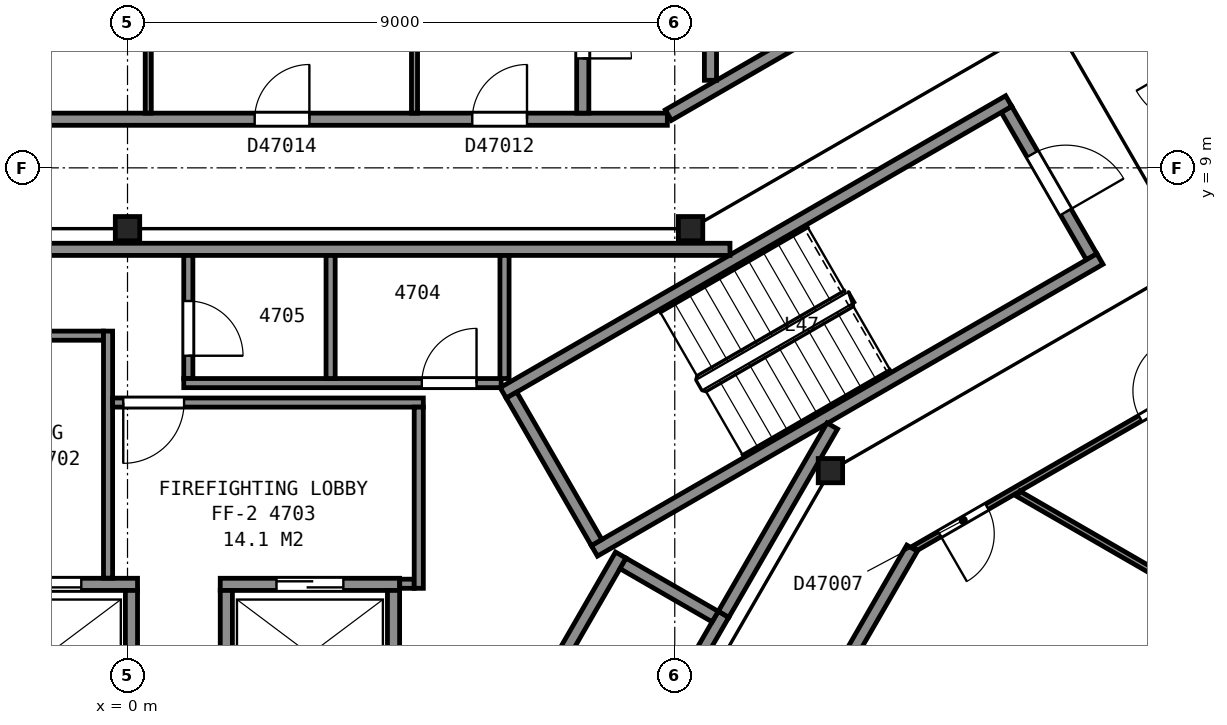
"""IFC4 building model, lengths in metres.
Left out: names, types, materials, properties, quantities, classifications, styles, units other than length and angle.
Written with IfcOpenShell. Run it as: python <this file> out.ifc"""

import sys

from ifc_helpers import new_model, si_unit, direction, frame, frame_2d, origin, origin_2d, place, context, subcontext, project, spatial, rectangle, i_section, extrude, element, fill, save


model = new_model("IFC4")
c1 = context("Model", 3, precision=1e-05, world=origin(), true_north=direction((0.0, 1.0)))
c2 = subcontext(c1, "Body", "Model", "MODEL_VIEW")
j1 = project(units=[si_unit("LENGTHUNIT", "METRE"), si_unit("PLANEANGLEUNIT", "RADIAN")], contexts=[c1])
p1 = place(None, origin())
s1 = spatial("IfcSite", under=j1, at=p1, CompositionType="ELEMENT")
p2 = place(p1, origin())
s2 = spatial("IfcBuilding", under=s1, at=p2, CompositionType="ELEMENT")
p3 = place(p2, frame((0.0, 0.0, 189.5)))
s3 = spatial("IfcBuildingStorey", under=s2, at=p3, CompositionType="ELEMENT", Elevation=189.5)
for number, where, z_axis, x_axis in (
    (1, (11.56, 4.02, 0.0), (0.0, 0.0, 1.0), (1.0, 0.0, 0.0)),
    (2, (9.26, 8.0, 0.0), (0.0, 0.0, 1.0), (1.0, 0.0, 0.0)),
    (3, (0.0, 8.0, 0.0), (0.0, 0.0, 1.0), (1.0, 0.0, 0.0)),
):
    element("IfcColumn", number, at=place(p3, frame(where, z_axis=z_axis, x_axis=x_axis)), inside=s3, PredefinedType="COLUMN", context=c2, shape_type="SweptSolid", body=[
        extrude(i_section(OverallWidth=0.401, OverallDepth=0.399, WebThickness=0.025, FlangeThickness=0.04, FilletRadius=0.015, at=origin_2d()), origin(), (0.0, 0.0, 1.0), 3.7),
    ])
p4 = place(p3, frame((15.855, 7.538, 0.0), z_axis=(0.0, 0.0, 1.0), x_axis=(-0.500049511043, 0.865996816683, 0.0)))
e4 = element("IfcWall", 4, at=p4, inside=s3, PredefinedType="PARTITIONING", context=c2, shape_type="SweptSolid", body=[
    extrude(rectangle(XDim=2.8, YDim=0.2, at=frame_2d((1.4, 0.0))), origin(), (0.0, 0.0, 1.0), 3.45),
])
p5 = place(p4, frame((0.85, 0.0, 0.0)))
e5 = element("IfcOpeningElement", 5, at=p5, cuts=e4, PredefinedType="OPENING", context=c2, shape_type="SweptSolid", body=[
    extrude(rectangle(XDim=1.1, YDim=2.1, at=frame_2d((0.55, 1.05))), frame((0.0, 0.11, 0.0), z_axis=(0.0, -1.0, 0.0), x_axis=(1.0, 0.0, 0.0)), (0.0, 0.0, 1.0), 0.22),
])
for number, where, z_axis, x_axis in (
    (6, (6.178, 5.299, 0.0), (0.0, 0.0, 1.0), (0.866, 0.5, 0.0)),
    (7, (7.678, 2.701, 0.0), (0.0, 0.0, 1.0), (0.866, 0.5, 0.0)),
):
    element("IfcWall", number, at=place(p3, frame(where, z_axis=z_axis, x_axis=x_axis)), inside=s3, PredefinedType="PARTITIONING", context=c2, shape_type="SweptSolid", body=[
        extrude(rectangle(XDim=9.6, YDim=0.2, at=frame_2d((4.8, 0.0))), origin(), (0.0, 0.0, 1.0), 3.45),
    ])
p6 = place(p3, frame((7.715, 2.838, 0.0), z_axis=(0.0, 0.0, 1.0), x_axis=(-0.500049511043, 0.865996816683, 0.0)))
e8 = element("IfcWall", 8, at=p6, inside=s3, PredefinedType="PARTITIONING", context=c2, shape_type="SweptSolid", body=[
    extrude(rectangle(XDim=2.8, YDim=0.2, at=frame_2d((1.4, 0.0))), origin(), (0.0, 0.0, 1.0), 3.45),
])
p7 = place(p3, frame((-2.785, 2.15, 0.0), z_axis=(0.0, 0.0, 1.0), x_axis=(1.0, 0.0, 0.0)))
e9 = element("IfcWall", 9, at=p7, inside=s3, PredefinedType="PARTITIONING", context=c2, shape_type="SweptSolid", body=[
    extrude(rectangle(XDim=2.95, YDim=0.2, at=frame_2d((1.475, 0.0))), origin(), (0.0, 0.0, 1.0), 3.7),
])
p8 = place(p7, frame((0.925, 0.0, 0.0)))
e10 = element("IfcOpeningElement", 10, at=p8, cuts=e9, PredefinedType="OPENING", context=c2, shape_type="SweptSolid", body=[
    extrude(rectangle(XDim=1.1, YDim=2.1, at=frame_2d((0.55, 1.05))), frame((0.0, 0.11, 0.0), z_axis=(0.0, -1.0, 0.0), x_axis=(1.0, 0.0, 0.0)), (0.0, 0.0, 1.0), 0.22),
])
p9 = place(p3, frame((1.525, 2.15, 0.0), z_axis=(0.0, 0.0, 1.0), x_axis=(1.0, 0.0, 0.0)))
e11 = element("IfcWall", 11, at=p9, inside=s3, PredefinedType="PARTITIONING", context=c2, shape_type="SweptSolid", body=[
    extrude(rectangle(XDim=2.95, YDim=0.2, at=frame_2d((1.475, 0.0))), origin(), (0.0, 0.0, 1.0), 3.7),
])
p10 = place(p9, frame((0.925, 0.0, 0.0)))
e12 = element("IfcOpeningElement", 12, at=p10, cuts=e11, PredefinedType="OPENING", context=c2, shape_type="SweptSolid", body=[
    extrude(rectangle(XDim=1.1, YDim=2.1, at=frame_2d((0.55, 1.05))), frame((0.0, 0.11, 0.0), z_axis=(0.0, -1.0, 0.0), x_axis=(1.0, 0.0, 0.0)), (0.0, 0.0, 1.0), 0.22),
])
p11 = place(p3, frame((7.351, -2.587, 0.0), z_axis=(0.0, 0.0, 1.0), x_axis=(0.500002801628, 0.866023786258, 0.0)))
e13 = element("IfcWall", 13, at=p11, inside=s3, PredefinedType="PARTITIONING", context=c2, shape_type="SweptSolid", body=[
    extrude(rectangle(XDim=4.9, YDim=0.2, at=frame_2d((2.45, 0.0))), origin(), (0.0, 0.0, 1.0), 3.7),
])
p12 = place(p3, frame((5.663, -1.612, 0.0), z_axis=(0.0, 0.0, 1.0), x_axis=(0.49998122708, 0.866036242063, 0.0)))
e14 = element("IfcWall", 14, at=p12, inside=s3, PredefinedType="PARTITIONING", context=c2, shape_type="SweptSolid", body=[
    extrude(rectangle(XDim=4.9, YDim=0.2, at=frame_2d((2.45, 0.0))), origin(), (0.0, 0.0, 1.0), 3.7),
])
for number, where, z_axis, x_axis in (
    (15, (4.375, 0.1, 0.0), (0.0, 0.0, 1.0), (0.0, 1.0, 0.0)),
    (16, (1.625, 0.1, 0.0), (0.0, 0.0, 1.0), (0.0, 1.0, 0.0)),
    (17, (0.065, 0.1, 0.0), (0.0, 0.0, 1.0), (0.0, 1.0, 0.0)),
):
    element("IfcWall", number, at=place(p3, frame(where, z_axis=z_axis, x_axis=x_axis)), inside=s3, PredefinedType="PARTITIONING", context=c2, shape_type="SweptSolid", body=[
        extrude(rectangle(XDim=1.95, YDim=0.2, at=frame_2d((0.975, 0.0))), origin(), (0.0, 0.0, 1.0), 3.7),
    ])
p13 = place(p3, frame((9.665, 1.62, 0.0), z_axis=(0.0, 0.0, 1.0), x_axis=(-0.866002029911, 0.500040482552, 0.0)))
e18 = element("IfcWall", 18, at=p13, inside=s3, PredefinedType="PARTITIONING", context=c2, shape_type="SweptSolid", body=[
    extrude(rectangle(XDim=1.75, YDim=0.2, at=frame_2d((0.875, 0.0))), origin(), (0.0, 0.0, 1.0), 3.7),
])
p14 = place(p3, frame((-3.933, 6.24, 0.0), z_axis=(0.0, 0.0, 1.0), x_axis=(1.0, 0.0, 0.0)))
e19 = element("IfcWall", 19, at=p14, inside=s3, PredefinedType="PARTITIONING", context=c2, shape_type="SweptSolid", body=[
    extrude(rectangle(XDim=3.538, YDim=0.15, at=frame_2d((1.769, 0.0))), origin(), (0.0, 0.0, 1.0), 3.45),
])
p15 = place(p14, frame((1.3, 0.0, 0.0)))
e20 = element("IfcOpeningElement", 20, at=p15, cuts=e19, PredefinedType="OPENING", context=c2, shape_type="SweptSolid", body=[
    extrude(rectangle(XDim=1.0, YDim=2.1, at=frame_2d((0.5, 1.05))), frame((0.0, 0.085, 0.0), z_axis=(0.0, -1.0, 0.0), x_axis=(1.0, 0.0, 0.0)), (0.0, 0.0, 1.0), 0.17),
])
p16 = place(p3, frame((-3.933, 7.66, 0.0), z_axis=(0.0, 0.0, 1.0), x_axis=(1.0, 0.0, 0.0)))
e21 = element("IfcWall", 21, at=p16, inside=s3, PredefinedType="PARTITIONING", context=c2, shape_type="SweptSolid", body=[
    extrude(rectangle(XDim=13.841, YDim=0.2, at=frame_2d((6.92, 0.0))), origin(), (0.0, 0.0, 1.0), 3.45),
])
p17 = place(p3, frame((-0.32, 2.252, 0.0), z_axis=(0.0, 0.0, 1.0), x_axis=(0.0, 1.0, 0.0)))
e22 = element("IfcWall", 22, at=p17, inside=s3, PredefinedType="PARTITIONING", context=c2, shape_type="SweptSolid", body=[
    extrude(rectangle(XDim=4.063, YDim=0.15, at=frame_2d((2.031, 0.0))), origin(), (0.0, 0.0, 1.0), 3.45),
])
p18 = place(p3, frame((-0.245, 5.14, 0.0), z_axis=(0.0, 0.0, 1.0), x_axis=(1.0, 0.0, 0.0)))
e23 = element("IfcWall", 23, at=p18, inside=s3, PredefinedType="PARTITIONING", context=c2, shape_type="SweptSolid", body=[
    extrude(rectangle(XDim=5.11, YDim=0.15, at=frame_2d((2.555, 0.0))), origin(), (0.0, 0.0, 1.0), 3.45),
])
p19 = place(p18, frame((0.175, 0.0, 0.0)))
e24 = element("IfcOpeningElement", 24, at=p19, cuts=e23, PredefinedType="OPENING", context=c2, shape_type="SweptSolid", body=[
    extrude(rectangle(XDim=1.0, YDim=2.1, at=frame_2d((0.5, 1.05))), frame((0.0, 0.085, 0.0), z_axis=(0.0, -1.0, 0.0), x_axis=(1.0, 0.0, 0.0)), (0.0, 0.0, 1.0), 0.17),
])
p20 = place(p3, frame((1.0, 7.56, 0.0), z_axis=(0.0, 0.0, 1.0), x_axis=(0.0, -1.0, 0.0)))
e25 = element("IfcWall", 25, at=p20, inside=s3, PredefinedType="PARTITIONING", context=c2, shape_type="SweptSolid", body=[
    extrude(rectangle(XDim=2.025, YDim=0.15, at=frame_2d((1.013, 0.0))), origin(), (0.0, 0.0, 1.0), 3.45),
])
p21 = place(p20, frame((0.75, 0.0, 0.0)))
e26 = element("IfcOpeningElement", 26, at=p21, cuts=e25, PredefinedType="OPENING", context=c2, shape_type="SweptSolid", body=[
    extrude(rectangle(XDim=0.9, YDim=2.1, at=frame_2d((0.45, 1.05))), frame((0.0, 0.085, 0.0), z_axis=(0.0, -1.0, 0.0), x_axis=(1.0, 0.0, 0.0)), (0.0, 0.0, 1.0), 0.17),
])
p22 = place(p3, frame((0.925, 5.46, 0.0), z_axis=(0.0, 0.0, 1.0), x_axis=(1.0, 0.0, 0.0)))
e27 = element("IfcWall", 27, at=p22, inside=s3, PredefinedType="PARTITIONING", context=c2, shape_type="SweptSolid", body=[
    extrude(rectangle(XDim=5.22, YDim=0.15, at=frame_2d((2.61, 0.0))), origin(), (0.0, 0.0, 1.0), 3.45),
])
p23 = place(p22, frame((3.915, 0.0, 0.0)))
e28 = element("IfcOpeningElement", 28, at=p23, cuts=e27, PredefinedType="OPENING", context=c2, shape_type="SweptSolid", body=[
    extrude(rectangle(XDim=0.9, YDim=2.1, at=frame_2d((0.45, 1.05))), frame((0.0, 0.085, 0.0), z_axis=(0.0, -1.0, 0.0), x_axis=(1.0, 0.0, 0.0)), (0.0, 0.0, 1.0), 0.17),
])
p24 = place(p3, frame((3.34, 5.535, 0.0), z_axis=(0.0, 0.0, 1.0), x_axis=(0.0, 1.0, 0.0)))
e29 = element("IfcWall", 29, at=p24, inside=s3, PredefinedType="PARTITIONING", context=c2, shape_type="SweptSolid", body=[
    extrude(rectangle(XDim=2.025, YDim=0.15, at=frame_2d((1.013, 0.0))), origin(), (0.0, 0.0, 1.0), 3.45),
])
p25 = place(p3, frame((4.477, 2.16, 0.0), z_axis=(0.0, 0.0, 1.0), x_axis=(1.0, 0.0, 0.0)))
e30 = element("IfcWall", 30, at=p25, inside=s3, PredefinedType="PARTITIONING", context=c2, shape_type="SweptSolid", body=[
    extrude(rectangle(XDim=0.238, YDim=0.15, at=frame_2d((0.119, 0.0))), origin(), (0.0, 0.0, 1.0), 3.45),
])
p26 = place(p3, frame((4.79, 2.085, 0.0), z_axis=(0.0, 0.0, 1.0), x_axis=(0.0, 1.0, 0.0)))
e31 = element("IfcWall", 31, at=p26, inside=s3, PredefinedType="PARTITIONING", context=c2, shape_type="SweptSolid", body=[
    extrude(rectangle(XDim=2.98, YDim=0.15, at=frame_2d((1.49, 0.0))), origin(), (0.0, 0.0, 1.0), 3.45),
])
p27 = place(p3, frame((6.2, 5.535, 0.0), z_axis=(0.0, 0.0, 1.0), x_axis=(0.0, 1.0, 0.0)))
e32 = element("IfcWall", 32, at=p27, inside=s3, PredefinedType="PARTITIONING", context=c2, shape_type="SweptSolid", body=[
    extrude(rectangle(XDim=2.025, YDim=0.15, at=frame_2d((1.013, 0.0))), origin(), (0.0, 0.0, 1.0), 3.45),
])
p28 = place(p3, frame((9.803, 1.658, 0.0), z_axis=(0.0, 0.0, 1.0), x_axis=(0.499943114462, 0.866058244174, 0.0)))
e33 = element("IfcWall", 33, at=p28, inside=s3, PredefinedType="PARTITIONING", context=c2, shape_type="SweptSolid", body=[
    extrude(rectangle(XDim=3.576, YDim=0.2, at=frame_2d((1.788, 0.0))), origin(), (0.0, 0.0, 1.0), 3.45),
])
p29 = place(p3, frame((-8.828, 9.8, 0.0), z_axis=(0.0, 0.0, 1.0), x_axis=(1.0, 0.0, 0.0)))
e34 = element("IfcWall", 34, at=p29, inside=s3, PredefinedType="PARTITIONING", context=c2, shape_type="SweptSolid", body=[
    extrude(rectangle(XDim=17.706, YDim=0.2, at=frame_2d((8.853, 0.0))), origin(), (0.0, 0.0, 1.0), 2.713),
])
p30 = place(p29, frame((14.498, 0.0, 0.0)))
e35 = element("IfcOpeningElement", 35, at=p30, cuts=e34, PredefinedType="OPENING", context=c2, shape_type="SweptSolid", body=[
    extrude(rectangle(XDim=0.9, YDim=2.1, at=frame_2d((0.45, 1.05))), frame((0.0, 0.11, 0.0), z_axis=(0.0, -1.0, 0.0), x_axis=(1.0, 0.0, 0.0)), (0.0, 0.0, 1.0), 0.22),
])
p31 = place(p29, frame((10.919, 0.0, 0.0)))
e36 = element("IfcOpeningElement", 36, at=p31, cuts=e34, PredefinedType="OPENING", context=c2, shape_type="SweptSolid", body=[
    extrude(rectangle(XDim=0.9, YDim=2.1, at=frame_2d((0.45, 1.05))), frame((0.0, 0.11, 0.0), z_axis=(0.0, -1.0, 0.0), x_axis=(1.0, 0.0, 0.0)), (0.0, 0.0, 1.0), 0.22),
])
p32 = place(p29, frame((6.113, 0.0, 0.0)))
e37 = element("IfcOpeningElement", 37, at=p32, cuts=e34, PredefinedType="OPENING", context=c2, shape_type="SweptSolid", body=[
    extrude(rectangle(XDim=0.9, YDim=2.1, at=frame_2d((0.45, 1.05))), frame((0.0, 0.11, 0.0), z_axis=(0.0, -1.0, 0.0), x_axis=(1.0, 0.0, 0.0)), (0.0, 0.0, 1.0), 0.22),
])
for number, where, z_axis, x_axis in (
    (38, (0.341, 9.9, 0.0), (0.0, 0.0, 1.0), (0.0, 1.0, 0.0)),
    (39, (4.72, 9.9, 0.0), (0.0, 0.0, 1.0), (0.0, 1.0, 0.0)),
):
    element("IfcWall", number, at=place(p3, frame(where, z_axis=z_axis, x_axis=x_axis)), inside=s3, PredefinedType="PARTITIONING", context=c2, shape_type="SweptSolid", body=[
        extrude(rectangle(XDim=8.435, YDim=0.1, at=frame_2d((4.218, 0.0))), origin(), (0.0, 0.0, 1.0), 2.713),
    ])
p33 = place(p3, frame((12.903, 2.745, 0.0), z_axis=(0.0, 0.0, 1.0), x_axis=(-0.499992063946, -0.866029985619, 0.0)))
e40 = element("IfcWall", 40, at=p33, inside=s3, PredefinedType="PARTITIONING", context=c2, shape_type="SweptSolid", body=[
    extrude(rectangle(XDim=12.907, YDim=0.2, at=frame_2d((6.454, 0.0))), origin(), (0.0, 0.0, 1.0), 2.713),
])
p34 = place(p33, frame((9.032, 0.0, 0.0)))
e41 = element("IfcOpeningElement", 41, at=p34, cuts=e40, PredefinedType="OPENING", context=c2, shape_type="SweptSolid", body=[
    extrude(rectangle(XDim=0.9, YDim=2.1, at=frame_2d((0.45, 1.05))), frame((0.0, 0.11, 0.0), z_axis=(0.0, -1.0, 0.0), x_axis=(1.0, 0.0, 0.0)), (0.0, 0.0, 1.0), 0.22),
])
p35 = place(p33, frame((5.349, 0.0, 0.0)))
e42 = element("IfcOpeningElement", 42, at=p35, cuts=e40, PredefinedType="OPENING", context=c2, shape_type="SweptSolid", body=[
    extrude(rectangle(XDim=0.9, YDim=2.1, at=frame_2d((0.45, 1.05))), frame((0.0, 0.11, 0.0), z_axis=(0.0, -1.0, 0.0), x_axis=(1.0, 0.0, 0.0)), (0.0, 0.0, 1.0), 0.22),
])
p36 = place(p3, frame((7.487, 12.7, 0.0), z_axis=(0.0, 0.0, 1.0), x_axis=(0.0, -1.0, 0.0)))
e43 = element("IfcWall", 43, at=p36, inside=s3, PredefinedType="PARTITIONING", context=c2, shape_type="SweptSolid", body=[
    extrude(rectangle(XDim=2.8, YDim=0.2, at=frame_2d((1.4, 0.0))), origin(), (0.0, 0.0, 1.0), 2.713),
])
p37 = place(p36, frame((1.1, 0.0, 0.0)))
e44 = element("IfcOpeningElement", 44, at=p37, cuts=e43, PredefinedType="OPENING", context=c2, shape_type="SweptSolid", body=[
    extrude(rectangle(XDim=0.8, YDim=2.1, at=frame_2d((0.4, 1.05))), frame((0.0, 0.11, 0.0), z_axis=(0.0, -1.0, 0.0), x_axis=(1.0, 0.0, 0.0)), (0.0, 0.0, 1.0), 0.22),
])
p38 = place(p3, frame((8.895, 9.867, 0.0), z_axis=(0.0, 0.0, 1.0), x_axis=(0.866079355551, 0.499906541154, 0.0)))
e45 = element("IfcWall", 45, at=p38, inside=s3, PredefinedType="PARTITIONING", context=c2, shape_type="SweptSolid", body=[
    extrude(rectangle(XDim=8.113, YDim=0.2, at=frame_2d((4.056, 0.0))), origin(), (0.0, 0.0, 1.0), 2.713),
])
p39 = place(p38, frame((5.201, 0.0, 0.0)))
e46 = element("IfcOpeningElement", 46, at=p39, cuts=e45, PredefinedType="OPENING", context=c2, shape_type="SweptSolid", body=[
    extrude(rectangle(XDim=0.9, YDim=2.1, at=frame_2d((0.45, 1.05))), frame((0.0, 0.11, 0.0), z_axis=(0.0, -1.0, 0.0), x_axis=(1.0, 0.0, 0.0)), (0.0, 0.0, 1.0), 0.22),
])
p40 = place(p3, frame((9.587, 10.44, 0.0), z_axis=(0.0, 0.0, 1.0), x_axis=(0.0, 1.0, 0.0)))
e47 = element("IfcWall", 47, at=p40, inside=s3, PredefinedType="PARTITIONING", context=c2, shape_type="SweptSolid", body=[
    extrude(rectangle(XDim=7.895, YDim=0.2, at=frame_2d((3.947, 0.0))), origin(), (0.0, 0.0, 1.0), 2.713),
])
p41 = place(p3, frame((20.023, 6.826, 0.0), z_axis=(0.0, 0.0, 1.0), x_axis=(-0.86608949446, -0.499888975259, 0.0)))
e48 = element("IfcWall", 48, at=p41, inside=s3, PredefinedType="PARTITIONING", context=c2, shape_type="SweptSolid", body=[
    extrude(rectangle(XDim=8.165, YDim=0.1, at=frame_2d((4.083, 0.0))), origin(), (0.0, 0.0, 1.0), 2.713),
])
p42 = place(p41, frame((6.8, 0.0, 0.0)))
e49 = element("IfcOpeningElement", 49, at=p42, cuts=e48, PredefinedType="OPENING", context=c2, shape_type="SweptSolid", body=[
    extrude(rectangle(XDim=0.9, YDim=2.1, at=frame_2d((0.45, 1.05))), frame((0.0, 0.06, 0.0), z_axis=(0.0, -1.0, 0.0), x_axis=(1.0, 0.0, 0.0)), (0.0, 0.0, 1.0), 0.12),
])
p43 = place(p41, frame((2.989, 0.0, 0.0)))
e50 = element("IfcOpeningElement", 50, at=p43, cuts=e48, PredefinedType="OPENING", context=c2, shape_type="SweptSolid", body=[
    extrude(rectangle(XDim=0.9, YDim=2.1, at=frame_2d((0.45, 1.05))), frame((0.0, 0.06, 0.0), z_axis=(0.0, -1.0, 0.0), x_axis=(1.0, 0.0, 0.0)), (0.0, 0.0, 1.0), 0.12),
])
p44 = place(p3, frame((14.651, 3.64, 0.0), z_axis=(0.0, 0.0, 1.0), x_axis=(0.866021145342, -0.500007375767, 0.0)))
e51 = element("IfcWall", 51, at=p44, inside=s3, PredefinedType="PARTITIONING", context=c2, shape_type="SweptSolid", body=[
    extrude(rectangle(XDim=7.467, YDim=0.1, at=frame_2d((3.733, 0.0))), origin(), (0.0, 0.0, 1.0), 2.713),
])
p45 = place(p3, frame((15.928, 13.812, 0.0), z_axis=(0.0, 0.0, 1.0), x_axis=(0.500422653123, -0.865781247337, 0.0)))
e52 = element("IfcWall", 52, at=p45, inside=s3, PredefinedType="PARTITIONING", context=c2, shape_type="SweptSolid", body=[
    extrude(rectangle(XDim=8.047, YDim=0.1, at=frame_2d((4.024, 0.0))), origin(), (0.0, 0.0, 1.0), 2.713),
])
p46 = place(p45, frame((3.4, 0.0, 0.0)))
e53 = element("IfcOpeningElement", 53, at=p46, cuts=e52, PredefinedType="OPENING", context=c2, shape_type="SweptSolid", body=[
    extrude(rectangle(XDim=1.2, YDim=2.1, at=frame_2d((0.6, 1.05))), frame((0.0, 0.06, 0.0), z_axis=(0.0, -1.0, 0.0), x_axis=(1.0, 0.0, 0.0)), (0.0, 0.0, 1.0), 0.12),
])
p47 = place(p5, origin())
e54 = element("IfcDoor", 54, at=p47, inside=s3, OperationType="SINGLE_SWING_LEFT", PredefinedType="DOOR", context=c2, shape_type="SweptSolid", body=[
    extrude(rectangle(XDim=1.1, YDim=2.1, at=frame_2d((0.55, 1.05))), frame((0.0, 0.025, 0.0), z_axis=(0.0, -1.0, 0.0), x_axis=(1.0, 0.0, 0.0)), (0.0, 0.0, 1.0), 0.05),
])
fill(e5, e54)
p48 = place(p8, origin())
e55 = element("IfcDoor", 55, at=p48, inside=s3, OperationType="SLIDING_TO_LEFT", PredefinedType="DOOR", context=c2, shape_type="SweptSolid", body=[
    extrude(rectangle(XDim=1.1, YDim=2.1, at=frame_2d((0.55, 1.05))), frame((0.0, 0.025, 0.0), z_axis=(0.0, -1.0, 0.0), x_axis=(1.0, 0.0, 0.0)), (0.0, 0.0, 1.0), 0.05),
])
fill(e10, e55)
p49 = place(p10, origin())
e56 = element("IfcDoor", 56, at=p49, inside=s3, OperationType="SLIDING_TO_RIGHT", PredefinedType="DOOR", context=c2, shape_type="SweptSolid", body=[
    extrude(rectangle(XDim=1.1, YDim=2.1, at=frame_2d((0.55, 1.05))), frame((0.0, 0.025, 0.0), z_axis=(0.0, -1.0, 0.0), x_axis=(1.0, 0.0, 0.0)), (0.0, 0.0, 1.0), 0.05),
])
fill(e12, e56)
p50 = place(p19, origin())
e57 = element("IfcDoor", 57, at=p50, inside=s3, OperationType="SINGLE_SWING_LEFT", PredefinedType="DOOR", context=c2, shape_type="SweptSolid", body=[
    extrude(rectangle(XDim=1.0, YDim=2.1, at=frame_2d((0.5, 1.05))), frame((0.0, 0.025, 0.0), z_axis=(0.0, -1.0, 0.0), x_axis=(1.0, 0.0, 0.0)), (0.0, 0.0, 1.0), 0.05),
])
fill(e24, e57)
p51 = place(p21, origin())
e58 = element("IfcDoor", 58, at=p51, inside=s3, OperationType="SINGLE_SWING_RIGHT", PredefinedType="DOOR", context=c2, shape_type="SweptSolid", body=[
    extrude(rectangle(XDim=0.9, YDim=2.1, at=frame_2d((0.45, 1.05))), frame((0.0, 0.025, 0.0), z_axis=(0.0, -1.0, 0.0), x_axis=(1.0, 0.0, 0.0)), (0.0, 0.0, 1.0), 0.05),
])
fill(e26, e58)
p52 = place(p23, origin())
e59 = element("IfcDoor", 59, at=p52, inside=s3, OperationType="SINGLE_SWING_RIGHT", PredefinedType="DOOR", context=c2, shape_type="SweptSolid", body=[
    extrude(rectangle(XDim=0.9, YDim=2.1, at=frame_2d((0.45, 1.05))), frame((0.0, 0.025, 0.0), z_axis=(0.0, -1.0, 0.0), x_axis=(1.0, 0.0, 0.0)), (0.0, 0.0, 1.0), 0.05),
])
fill(e28, e59)
p53 = place(p30, origin())
e60 = element("IfcDoor", 60, at=p53, inside=s3, OperationType="SINGLE_SWING_RIGHT", PredefinedType="DOOR", context=c2, shape_type="SweptSolid", body=[
    extrude(rectangle(XDim=0.9, YDim=2.1, at=frame_2d((0.45, 1.05))), frame((0.0, 0.025, 0.0), z_axis=(0.0, -1.0, 0.0), x_axis=(1.0, 0.0, 0.0)), (0.0, 0.0, 1.0), 0.05),
])
fill(e35, e60)
p54 = place(p31, origin())
e61 = element("IfcDoor", 61, at=p54, inside=s3, OperationType="SINGLE_SWING_RIGHT", PredefinedType="DOOR", context=c2, shape_type="SweptSolid", body=[
    extrude(rectangle(XDim=0.9, YDim=2.1, at=frame_2d((0.45, 1.05))), frame((0.0, 0.025, 0.0), z_axis=(0.0, -1.0, 0.0), x_axis=(1.0, 0.0, 0.0)), (0.0, 0.0, 1.0), 0.05),
])
fill(e36, e61)
p55 = place(p37, origin())
e62 = element("IfcDoor", 62, at=p55, inside=s3, OperationType="SINGLE_SWING_RIGHT", PredefinedType="DOOR", context=c2, shape_type="SweptSolid", body=[
    extrude(rectangle(XDim=0.8, YDim=2.1, at=frame_2d((0.4, 1.05))), frame((0.0, 0.025, 0.0), z_axis=(0.0, -1.0, 0.0), x_axis=(1.0, 0.0, 0.0)), (0.0, 0.0, 1.0), 0.05),
])
fill(e44, e62)
p56 = place(p42, origin())
e63 = element("IfcDoor", 63, at=p56, inside=s3, OperationType="SINGLE_SWING_RIGHT", PredefinedType="DOOR", context=c2, shape_type="SweptSolid", body=[
    extrude(rectangle(XDim=0.9, YDim=2.1, at=frame_2d((0.45, 1.05))), frame((0.0, 0.025, 0.0), z_axis=(0.0, -1.0, 0.0), x_axis=(1.0, 0.0, 0.0)), (0.0, 0.0, 1.0), 0.05),
])
fill(e49, e63)
p57 = place(p43, origin())
e64 = element("IfcDoor", 64, at=p57, inside=s3, OperationType="SINGLE_SWING_LEFT", PredefinedType="DOOR", context=c2, shape_type="SweptSolid", body=[
    extrude(rectangle(XDim=0.9, YDim=2.1, at=frame_2d((0.45, 1.05))), frame((0.0, 0.025, 0.0), z_axis=(0.0, -1.0, 0.0), x_axis=(1.0, 0.0, 0.0)), (0.0, 0.0, 1.0), 0.05),
])
fill(e50, e64)
save(model, sys.argv[1])
